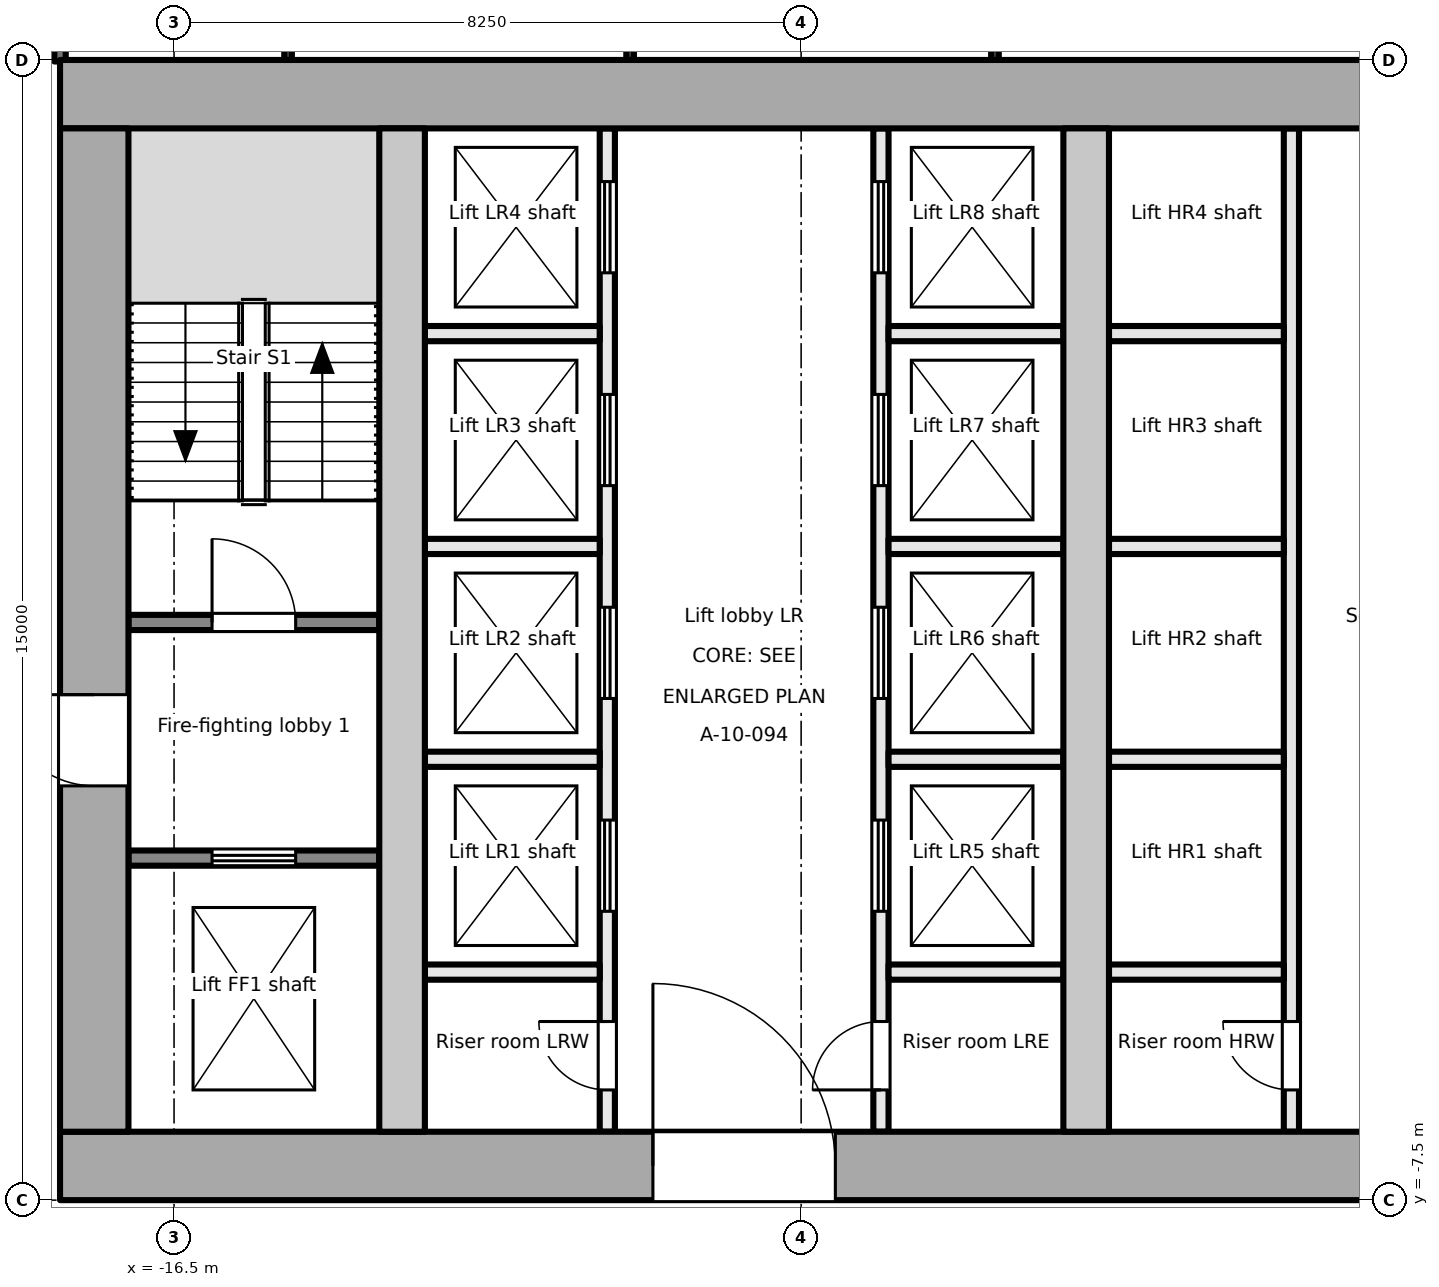
"""IFC4 building model, lengths in metres.
Left out: names, types, materials, properties, quantities, classifications, styles, units other than length and angle.
Written with IfcOpenShell. Run it as: python <this file> out.ifc"""

import sys

from ifc_helpers import new_model, si_unit, direction, frame, frame_2d, origin, place, context, subcontext, project, spatial, rectangle, extrude, element, fill, save


model = new_model("IFC4")
c1 = context("Model", 3, precision=1e-05, world=origin(), true_north=direction((0.0, 1.0)))
c2 = subcontext(c1, "Body", "Model", "MODEL_VIEW")
j1 = project(units=[si_unit("LENGTHUNIT", "METRE"), si_unit("PLANEANGLEUNIT", "RADIAN")], contexts=[c1])
p1 = place(None, origin())
s1 = spatial("IfcSite", under=j1, at=p1, CompositionType="ELEMENT")
p2 = place(p1, origin())
s2 = spatial("IfcBuilding", under=s1, at=p2, CompositionType="ELEMENT")
p3 = place(p2, frame((0.0, 0.0, 107.7)))
s3 = spatial("IfcBuildingStorey", under=s2, at=p3, CompositionType="ELEMENT", Elevation=107.7)
p4 = place(p3, frame((-18.0, -7.05, -0.2), z_axis=(0.0, 0.0, 1.0), x_axis=(1.0, 0.0, 0.0)))
e1 = element("IfcWall", 1, at=p4, inside=s3, PredefinedType="SHEAR", context=c2, shape_type="SweptSolid", body=[
    extrude(rectangle(XDim=36.0, YDim=0.9, at=frame_2d((18.0, 0.0))), origin(), (0.0, 0.0, 1.0), 4.0),
])
p5 = place(p4, frame((7.8, 0.0, 0.2)))
e2 = element("IfcOpeningElement", 2, at=p5, cuts=e1, PredefinedType="OPENING", context=c2, shape_type="SweptSolid", body=[
    extrude(rectangle(XDim=2.4, YDim=2.1, at=frame_2d((1.2, 1.05))), frame((0.0, 0.46, 0.0), z_axis=(0.0, -1.0, 0.0), x_axis=(1.0, 0.0, 0.0)), (0.0, 0.0, 1.0), 0.921),
])
p6 = place(p4, frame((17.4, 0.0, 0.2)))
e3 = element("IfcOpeningElement", 3, at=p6, cuts=e1, PredefinedType="OPENING", context=c2, shape_type="SweptSolid", body=[
    extrude(rectangle(XDim=1.2, YDim=2.1, at=frame_2d((0.6, 1.05))), frame((0.0, 0.46, 0.0), z_axis=(0.0, -1.0, 0.0), x_axis=(1.0, 0.0, 0.0)), (0.0, 0.0, 1.0), 0.921),
])
p7 = place(p4, frame((26.1, 0.0, 0.2)))
e4 = element("IfcOpeningElement", 4, at=p7, cuts=e1, PredefinedType="OPENING", context=c2, shape_type="SweptSolid", body=[
    extrude(rectangle(XDim=2.4, YDim=2.1, at=frame_2d((1.2, 1.05))), frame((0.0, 0.46, 0.0), z_axis=(0.0, -1.0, 0.0), x_axis=(1.0, 0.0, 0.0)), (0.0, 0.0, 1.0), 0.921),
])
p8 = place(p3, frame((-18.0, 7.05, -0.2), z_axis=(0.0, 0.0, 1.0), x_axis=(1.0, 0.0, 0.0)))
e5 = element("IfcWall", 5, at=p8, inside=s3, PredefinedType="SHEAR", context=c2, shape_type="SweptSolid", body=[
    extrude(rectangle(XDim=36.0, YDim=0.9, at=frame_2d((18.0, 0.0))), origin(), (0.0, 0.0, 1.0), 4.0),
])
p9 = place(p3, frame((-17.55, -6.6, -0.2), z_axis=(0.0, 0.0, 1.0), x_axis=(0.0, 1.0, 0.0)))
e6 = element("IfcWall", 6, at=p9, inside=s3, PredefinedType="SHEAR", context=c2, shape_type="SweptSolid", body=[
    extrude(rectangle(XDim=13.2, YDim=0.9, at=frame_2d((6.6, 0.0))), origin(), (0.0, 0.0, 1.0), 4.0),
])
p10 = place(p9, frame((4.55, 0.0, 0.2)))
e7 = element("IfcOpeningElement", 7, at=p10, cuts=e6, PredefinedType="OPENING", context=c2, shape_type="SweptSolid", body=[
    extrude(rectangle(XDim=1.2, YDim=2.1, at=frame_2d((0.6, 1.05))), frame((0.0, 0.46, 0.0), z_axis=(0.0, -1.0, 0.0), x_axis=(1.0, 0.0, 0.0)), (0.0, 0.0, 1.0), 0.921),
])
for number, where, z_axis, x_axis in (
    (8, (-13.5, -6.6, -0.2), (0.0, 0.0, 1.0), (0.0, 1.0, 0.0)),
    (9, (-4.5, -6.6, -0.2), (0.0, 0.0, 1.0), (0.0, 1.0, 0.0)),
):
    element("IfcWall", number, at=place(p3, frame(where, z_axis=z_axis, x_axis=x_axis)), inside=s3, PredefinedType="SHEAR", context=c2, shape_type="SweptSolid", body=[
        extrude(rectangle(XDim=13.2, YDim=0.6, at=frame_2d((6.6, 0.0))), origin(), (0.0, 0.0, 1.0), 4.0),
    ])
p11 = place(p3, frame((-17.1, -3.0, 0.0), z_axis=(0.0, 0.0, 1.0), x_axis=(1.0, 0.0, 0.0)))
e10 = element("IfcWall", 10, at=p11, inside=s3, PredefinedType="PARTITIONING", context=c2, shape_type="SweptSolid", body=[
    extrude(rectangle(XDim=3.3, YDim=0.2, at=frame_2d((1.65, 0.0))), origin(), (0.0, 0.0, 1.0), 3.8),
])
p12 = place(p11, frame((1.1, 0.0, 0.0)))
e11 = element("IfcOpeningElement", 11, at=p12, cuts=e10, PredefinedType="OPENING", context=c2, shape_type="SweptSolid", body=[
    extrude(rectangle(XDim=1.1, YDim=2.1, at=frame_2d((0.55, 1.05))), frame((0.0, 0.111, 0.0), z_axis=(0.0, -1.0, 0.0), x_axis=(1.0, 0.0, 0.0)), (0.0, 0.0, 1.0), 0.221),
])
p13 = place(p3, frame((-17.1, 0.1, 0.0), z_axis=(0.0, 0.0, 1.0), x_axis=(1.0, 0.0, 0.0)))
e12 = element("IfcWall", 12, at=p13, inside=s3, PredefinedType="PARTITIONING", context=c2, shape_type="SweptSolid", body=[
    extrude(rectangle(XDim=3.3, YDim=0.2, at=frame_2d((1.65, 0.0))), origin(), (0.0, 0.0, 1.0), 3.8),
])
p14 = place(p13, frame((1.1, 0.0, 0.0)))
e13 = element("IfcOpeningElement", 13, at=p14, cuts=e12, PredefinedType="OPENING", context=c2, shape_type="SweptSolid", body=[
    extrude(rectangle(XDim=1.1, YDim=2.1, at=frame_2d((0.55, 1.05))), frame((0.0, 0.111, 0.0), z_axis=(0.0, -1.0, 0.0), x_axis=(1.0, 0.0, 0.0)), (0.0, 0.0, 1.0), 0.221),
])
p15 = place(p3, frame((-10.8, -6.6, 0.0), z_axis=(0.0, 0.0, 1.0), x_axis=(0.0, 1.0, 0.0)))
e14 = element("IfcWall", 14, at=p15, inside=s3, PredefinedType="PARTITIONING", context=c2, shape_type="SweptSolid", body=[
    extrude(rectangle(XDim=13.2, YDim=0.2, at=frame_2d((6.6, 0.0))), origin(), (0.0, 0.0, 1.0), 3.8),
])
p16 = place(p15, frame((0.55, 0.0, 0.0)))
e15 = element("IfcOpeningElement", 15, at=p16, cuts=e14, PredefinedType="OPENING", context=c2, shape_type="SweptSolid", body=[
    extrude(rectangle(XDim=0.9, YDim=2.1, at=frame_2d((0.45, 1.05))), frame((0.0, 0.111, 0.0), z_axis=(0.0, -1.0, 0.0), x_axis=(1.0, 0.0, 0.0)), (0.0, 0.0, 1.0), 0.221),
])
p17 = place(p15, frame((2.9, 0.0, 0.0)))
e16 = element("IfcOpeningElement", 16, at=p17, cuts=e14, PredefinedType="OPENING", context=c2, shape_type="SweptSolid", body=[
    extrude(rectangle(XDim=1.2, YDim=2.1, at=frame_2d((0.6, 1.05))), frame((0.0, 0.111, 0.0), z_axis=(0.0, -1.0, 0.0), x_axis=(1.0, 0.0, 0.0)), (0.0, 0.0, 1.0), 0.221),
])
p18 = place(p15, frame((5.7, 0.0, 0.0)))
e17 = element("IfcOpeningElement", 17, at=p18, cuts=e14, PredefinedType="OPENING", context=c2, shape_type="SweptSolid", body=[
    extrude(rectangle(XDim=1.2, YDim=2.1, at=frame_2d((0.6, 1.05))), frame((0.0, 0.111, 0.0), z_axis=(0.0, -1.0, 0.0), x_axis=(1.0, 0.0, 0.0)), (0.0, 0.0, 1.0), 0.221),
])
p19 = place(p15, frame((8.5, 0.0, 0.0)))
e18 = element("IfcOpeningElement", 18, at=p19, cuts=e14, PredefinedType="OPENING", context=c2, shape_type="SweptSolid", body=[
    extrude(rectangle(XDim=1.2, YDim=2.1, at=frame_2d((0.6, 1.05))), frame((0.0, 0.111, 0.0), z_axis=(0.0, -1.0, 0.0), x_axis=(1.0, 0.0, 0.0)), (0.0, 0.0, 1.0), 0.221),
])
p20 = place(p15, frame((11.3, 0.0, 0.0)))
e19 = element("IfcOpeningElement", 19, at=p20, cuts=e14, PredefinedType="OPENING", context=c2, shape_type="SweptSolid", body=[
    extrude(rectangle(XDim=1.2, YDim=2.1, at=frame_2d((0.6, 1.05))), frame((0.0, 0.111, 0.0), z_axis=(0.0, -1.0, 0.0), x_axis=(1.0, 0.0, 0.0)), (0.0, 0.0, 1.0), 0.221),
])
p21 = place(p3, frame((-7.2, -6.6, 0.0), z_axis=(0.0, 0.0, 1.0), x_axis=(0.0, 1.0, 0.0)))
e20 = element("IfcWall", 20, at=p21, inside=s3, PredefinedType="PARTITIONING", context=c2, shape_type="SweptSolid", body=[
    extrude(rectangle(XDim=13.2, YDim=0.2, at=frame_2d((6.6, 0.0))), origin(), (0.0, 0.0, 1.0), 3.8),
])
p22 = place(p21, frame((0.55, 0.0, 0.0)))
e21 = element("IfcOpeningElement", 21, at=p22, cuts=e20, PredefinedType="OPENING", context=c2, shape_type="SweptSolid", body=[
    extrude(rectangle(XDim=0.9, YDim=2.1, at=frame_2d((0.45, 1.05))), frame((0.0, 0.111, 0.0), z_axis=(0.0, -1.0, 0.0), x_axis=(1.0, 0.0, 0.0)), (0.0, 0.0, 1.0), 0.221),
])
p23 = place(p21, frame((2.9, 0.0, 0.0)))
e22 = element("IfcOpeningElement", 22, at=p23, cuts=e20, PredefinedType="OPENING", context=c2, shape_type="SweptSolid", body=[
    extrude(rectangle(XDim=1.2, YDim=2.1, at=frame_2d((0.6, 1.05))), frame((0.0, 0.111, 0.0), z_axis=(0.0, -1.0, 0.0), x_axis=(1.0, 0.0, 0.0)), (0.0, 0.0, 1.0), 0.221),
])
p24 = place(p21, frame((5.7, 0.0, 0.0)))
e23 = element("IfcOpeningElement", 23, at=p24, cuts=e20, PredefinedType="OPENING", context=c2, shape_type="SweptSolid", body=[
    extrude(rectangle(XDim=1.2, YDim=2.1, at=frame_2d((0.6, 1.05))), frame((0.0, 0.111, 0.0), z_axis=(0.0, -1.0, 0.0), x_axis=(1.0, 0.0, 0.0)), (0.0, 0.0, 1.0), 0.221),
])
p25 = place(p21, frame((8.5, 0.0, 0.0)))
e24 = element("IfcOpeningElement", 24, at=p25, cuts=e20, PredefinedType="OPENING", context=c2, shape_type="SweptSolid", body=[
    extrude(rectangle(XDim=1.2, YDim=2.1, at=frame_2d((0.6, 1.05))), frame((0.0, 0.111, 0.0), z_axis=(0.0, -1.0, 0.0), x_axis=(1.0, 0.0, 0.0)), (0.0, 0.0, 1.0), 0.221),
])
p26 = place(p21, frame((11.3, 0.0, 0.0)))
e25 = element("IfcOpeningElement", 25, at=p26, cuts=e20, PredefinedType="OPENING", context=c2, shape_type="SweptSolid", body=[
    extrude(rectangle(XDim=1.2, YDim=2.1, at=frame_2d((0.6, 1.05))), frame((0.0, 0.111, 0.0), z_axis=(0.0, -1.0, 0.0), x_axis=(1.0, 0.0, 0.0)), (0.0, 0.0, 1.0), 0.221),
])
for number, where, z_axis, x_axis in (
    (26, (-13.2, -1.7, 0.0), (0.0, 0.0, 1.0), (1.0, 0.0, 0.0)),
    (27, (-13.2, 1.1, 0.0), (0.0, 0.0, 1.0), (1.0, 0.0, 0.0)),
    (28, (-13.2, 3.9, 0.0), (0.0, 0.0, 1.0), (1.0, 0.0, 0.0)),
    (29, (-13.2, -4.5, 0.0), (0.0, 0.0, 1.0), (1.0, 0.0, 0.0)),
    (30, (-7.1, -1.7, 0.0), (0.0, 0.0, 1.0), (1.0, 0.0, 0.0)),
    (31, (-7.1, 1.1, 0.0), (0.0, 0.0, 1.0), (1.0, 0.0, 0.0)),
    (32, (-7.1, 3.9, 0.0), (0.0, 0.0, 1.0), (1.0, 0.0, 0.0)),
    (33, (-7.1, -4.5, 0.0), (0.0, 0.0, 1.0), (1.0, 0.0, 0.0)),
):
    element("IfcWall", number, at=place(p3, frame(where, z_axis=z_axis, x_axis=x_axis)), inside=s3, PredefinedType="PARTITIONING", context=c2, shape_type="SweptSolid", body=[
        extrude(rectangle(XDim=2.3, YDim=0.2, at=frame_2d((1.15, 0.0))), origin(), (0.0, 0.0, 1.0), 3.8),
    ])
p27 = place(p3, frame((-1.8, -6.6, 0.0), z_axis=(0.0, 0.0, 1.0), x_axis=(0.0, 1.0, 0.0)))
e34 = element("IfcWall", 34, at=p27, inside=s3, PredefinedType="PARTITIONING", context=c2, shape_type="SweptSolid", body=[
    extrude(rectangle(XDim=13.2, YDim=0.2, at=frame_2d((6.6, 0.0))), origin(), (0.0, 0.0, 1.0), 3.8),
])
p28 = place(p27, frame((0.55, 0.0, 0.0)))
e35 = element("IfcOpeningElement", 35, at=p28, cuts=e34, PredefinedType="OPENING", context=c2, shape_type="SweptSolid", body=[
    extrude(rectangle(XDim=0.9, YDim=2.1, at=frame_2d((0.45, 1.05))), frame((0.0, 0.111, 0.0), z_axis=(0.0, -1.0, 0.0), x_axis=(1.0, 0.0, 0.0)), (0.0, 0.0, 1.0), 0.221),
])
for number, where, z_axis, x_axis in (
    (36, (-4.2, -1.7, 0.0), (0.0, 0.0, 1.0), (1.0, 0.0, 0.0)),
    (37, (-4.2, 1.1, 0.0), (0.0, 0.0, 1.0), (1.0, 0.0, 0.0)),
    (38, (-4.2, 3.9, 0.0), (0.0, 0.0, 1.0), (1.0, 0.0, 0.0)),
    (39, (-4.2, -4.5, 0.0), (0.0, 0.0, 1.0), (1.0, 0.0, 0.0)),
):
    element("IfcWall", number, at=place(p3, frame(where, z_axis=z_axis, x_axis=x_axis)), inside=s3, PredefinedType="PARTITIONING", context=c2, shape_type="SweptSolid", body=[
        extrude(rectangle(XDim=2.3, YDim=0.2, at=frame_2d((1.15, 0.0))), origin(), (0.0, 0.0, 1.0), 3.8),
    ])
p29 = place(p3, frame((-18.0, 10.52, 0.0), z_axis=(0.0, 0.0, 1.0), x_axis=(0.0, -1.0, 0.0)))
e40 = element("IfcWall", 40, at=p29, inside=s3, PredefinedType="PARTITIONING", context=c2, shape_type="SweptSolid", body=[
    extrude(rectangle(XDim=3.04, YDim=0.15, at=frame_2d((1.52, 0.0))), origin(), (0.0, 0.0, 1.0), 3.8),
])
p30 = place(p3, frame((-15.0, 7.5, 0.0), z_axis=(0.0, 0.0, 1.0), x_axis=(0.0, 1.0, 0.0)))
e41 = element("IfcWall", 41, at=p30, inside=s3, PredefinedType="PARTITIONING", context=c2, shape_type="SweptSolid", body=[
    extrude(rectangle(XDim=3.0, YDim=0.1, at=frame_2d((1.5, 0.0))), origin(), (0.0, 0.0, 1.0), 3.8),
])
p31 = place(p30, frame((0.76, 0.0, 0.0)))
e42 = element("IfcOpeningElement", 42, at=p31, cuts=e41, PredefinedType="OPENING", context=c2, shape_type="SweptSolid", body=[
    extrude(rectangle(XDim=0.8, YDim=2.1, at=frame_2d((0.4, 1.05))), frame((0.0, 0.061, 0.0), z_axis=(0.0, -1.0, 0.0), x_axis=(1.0, 0.0, 0.0)), (0.0, 0.0, 1.0), 0.121),
])
p32 = place(p3, frame((-10.5, 10.45, 0.0), z_axis=(0.0, 0.0, 1.0), x_axis=(0.0, -1.0, 0.0)))
e43 = element("IfcWall", 43, at=p32, inside=s3, PredefinedType="PARTITIONING", context=c2, shape_type="SweptSolid", body=[
    extrude(rectangle(XDim=2.95, YDim=0.1, at=frame_2d((1.475, 0.0))), origin(), (0.0, 0.0, 1.0), 3.8),
])
p33 = place(p32, frame((1.075, 0.0, 0.0)))
e44 = element("IfcOpeningElement", 44, at=p33, cuts=e43, PredefinedType="OPENING", context=c2, shape_type="SweptSolid", body=[
    extrude(rectangle(XDim=0.8, YDim=2.1, at=frame_2d((0.4, 1.05))), frame((0.0, 0.061, 0.0), z_axis=(0.0, -1.0, 0.0), x_axis=(1.0, 0.0, 0.0)), (0.0, 0.0, 1.0), 0.121),
])
p34 = place(p3, frame((-5.7, 10.45, 0.0), z_axis=(0.0, 0.0, 1.0), x_axis=(0.0, -1.0, 0.0)))
e45 = element("IfcWall", 45, at=p34, inside=s3, PredefinedType="PARTITIONING", context=c2, shape_type="SweptSolid", body=[
    extrude(rectangle(XDim=2.95, YDim=0.1, at=frame_2d((1.475, 0.0))), origin(), (0.0, 0.0, 1.0), 3.8),
])
p35 = place(p34, frame((1.025, 0.0, 0.0)))
e46 = element("IfcOpeningElement", 46, at=p35, cuts=e45, PredefinedType="OPENING", context=c2, shape_type="SweptSolid", body=[
    extrude(rectangle(XDim=0.9, YDim=2.1, at=frame_2d((0.45, 1.05))), frame((0.0, 0.061, 0.0), z_axis=(0.0, -1.0, 0.0), x_axis=(1.0, 0.0, 0.0)), (0.0, 0.0, 1.0), 0.121),
])
p36 = place(p12, origin())
e47 = element("IfcDoor", 47, at=p36, inside=s3, OperationType="DOUBLE_DOOR_SLIDING", PredefinedType="DOOR", context=c2, shape_type="SweptSolid", body=[
    extrude(rectangle(XDim=1.1, YDim=2.1, at=frame_2d((0.55, 1.05))), frame((0.0, 0.025, 0.0), z_axis=(0.0, -1.0, 0.0), x_axis=(1.0, 0.0, 0.0)), (0.0, 0.0, 1.0), 0.05),
])
fill(e11, e47)
p37 = place(p10, origin())
e48 = element("IfcDoor", 48, at=p37, inside=s3, OperationType="SINGLE_SWING_RIGHT", PredefinedType="DOOR", context=c2, shape_type="SweptSolid", body=[
    extrude(rectangle(XDim=1.2, YDim=2.1, at=frame_2d((0.6, 1.05))), frame((0.0, 0.025, 0.0), z_axis=(0.0, -1.0, 0.0), x_axis=(1.0, 0.0, 0.0)), (0.0, 0.0, 1.0), 0.05),
])
fill(e7, e48)
p38 = place(p14, origin())
e49 = element("IfcDoor", 49, at=p38, inside=s3, OperationType="SINGLE_SWING_LEFT", PredefinedType="DOOR", context=c2, shape_type="SweptSolid", body=[
    extrude(rectangle(XDim=1.1, YDim=2.1, at=frame_2d((0.55, 1.05))), frame((0.0, 0.025, 0.0), z_axis=(0.0, -1.0, 0.0), x_axis=(1.0, 0.0, 0.0)), (0.0, 0.0, 1.0), 0.05),
])
fill(e13, e49)
p39 = place(p16, origin())
e50 = element("IfcDoor", 50, at=p39, inside=s3, OperationType="SINGLE_SWING_RIGHT", PredefinedType="DOOR", context=c2, shape_type="SweptSolid", body=[
    extrude(rectangle(XDim=0.9, YDim=2.1, at=frame_2d((0.45, 1.05))), frame((0.0, 0.025, 0.0), z_axis=(0.0, -1.0, 0.0), x_axis=(1.0, 0.0, 0.0)), (0.0, 0.0, 1.0), 0.05),
])
fill(e15, e50)
p40 = place(p17, origin())
e51 = element("IfcDoor", 51, at=p40, inside=s3, OperationType="DOUBLE_DOOR_SLIDING", PredefinedType="DOOR", context=c2, shape_type="SweptSolid", body=[
    extrude(rectangle(XDim=1.2, YDim=2.1, at=frame_2d((0.6, 1.05))), frame((0.0, 0.025, 0.0), z_axis=(0.0, -1.0, 0.0), x_axis=(1.0, 0.0, 0.0)), (0.0, 0.0, 1.0), 0.05),
])
fill(e16, e51)
p41 = place(p18, origin())
e52 = element("IfcDoor", 52, at=p41, inside=s3, OperationType="DOUBLE_DOOR_SLIDING", PredefinedType="DOOR", context=c2, shape_type="SweptSolid", body=[
    extrude(rectangle(XDim=1.2, YDim=2.1, at=frame_2d((0.6, 1.05))), frame((0.0, 0.025, 0.0), z_axis=(0.0, -1.0, 0.0), x_axis=(1.0, 0.0, 0.0)), (0.0, 0.0, 1.0), 0.05),
])
fill(e17, e52)
p42 = place(p19, origin())
e53 = element("IfcDoor", 53, at=p42, inside=s3, OperationType="DOUBLE_DOOR_SLIDING", PredefinedType="DOOR", context=c2, shape_type="SweptSolid", body=[
    extrude(rectangle(XDim=1.2, YDim=2.1, at=frame_2d((0.6, 1.05))), frame((0.0, 0.025, 0.0), z_axis=(0.0, -1.0, 0.0), x_axis=(1.0, 0.0, 0.0)), (0.0, 0.0, 1.0), 0.05),
])
fill(e18, e53)
p43 = place(p20, origin())
e54 = element("IfcDoor", 54, at=p43, inside=s3, OperationType="DOUBLE_DOOR_SLIDING", PredefinedType="DOOR", context=c2, shape_type="SweptSolid", body=[
    extrude(rectangle(XDim=1.2, YDim=2.1, at=frame_2d((0.6, 1.05))), frame((0.0, 0.025, 0.0), z_axis=(0.0, -1.0, 0.0), x_axis=(1.0, 0.0, 0.0)), (0.0, 0.0, 1.0), 0.05),
])
fill(e19, e54)
p44 = place(p22, origin())
e55 = element("IfcDoor", 55, at=p44, inside=s3, OperationType="SINGLE_SWING_LEFT", PredefinedType="DOOR", context=c2, shape_type="SweptSolid", body=[
    extrude(rectangle(XDim=0.9, YDim=2.1, at=frame_2d((0.45, 1.05))), frame((0.0, 0.025, 0.0), z_axis=(0.0, -1.0, 0.0), x_axis=(1.0, 0.0, 0.0)), (0.0, 0.0, 1.0), 0.05),
])
fill(e21, e55)
p45 = place(p23, origin())
e56 = element("IfcDoor", 56, at=p45, inside=s3, OperationType="DOUBLE_DOOR_SLIDING", PredefinedType="DOOR", context=c2, shape_type="SweptSolid", body=[
    extrude(rectangle(XDim=1.2, YDim=2.1, at=frame_2d((0.6, 1.05))), frame((0.0, 0.025, 0.0), z_axis=(0.0, -1.0, 0.0), x_axis=(1.0, 0.0, 0.0)), (0.0, 0.0, 1.0), 0.05),
])
fill(e22, e56)
p46 = place(p24, origin())
e57 = element("IfcDoor", 57, at=p46, inside=s3, OperationType="DOUBLE_DOOR_SLIDING", PredefinedType="DOOR", context=c2, shape_type="SweptSolid", body=[
    extrude(rectangle(XDim=1.2, YDim=2.1, at=frame_2d((0.6, 1.05))), frame((0.0, 0.025, 0.0), z_axis=(0.0, -1.0, 0.0), x_axis=(1.0, 0.0, 0.0)), (0.0, 0.0, 1.0), 0.05),
])
fill(e23, e57)
p47 = place(p25, origin())
e58 = element("IfcDoor", 58, at=p47, inside=s3, OperationType="DOUBLE_DOOR_SLIDING", PredefinedType="DOOR", context=c2, shape_type="SweptSolid", body=[
    extrude(rectangle(XDim=1.2, YDim=2.1, at=frame_2d((0.6, 1.05))), frame((0.0, 0.025, 0.0), z_axis=(0.0, -1.0, 0.0), x_axis=(1.0, 0.0, 0.0)), (0.0, 0.0, 1.0), 0.05),
])
fill(e24, e58)
p48 = place(p26, origin())
e59 = element("IfcDoor", 59, at=p48, inside=s3, OperationType="DOUBLE_DOOR_SLIDING", PredefinedType="DOOR", context=c2, shape_type="SweptSolid", body=[
    extrude(rectangle(XDim=1.2, YDim=2.1, at=frame_2d((0.6, 1.05))), frame((0.0, 0.025, 0.0), z_axis=(0.0, -1.0, 0.0), x_axis=(1.0, 0.0, 0.0)), (0.0, 0.0, 1.0), 0.05),
])
fill(e25, e59)
p49 = place(p5, origin())
e60 = element("IfcDoor", 60, at=p49, inside=s3, OperationType="DOUBLE_DOOR_DOUBLE_SWING", PredefinedType="DOOR", context=c2, shape_type="SweptSolid", body=[
    extrude(rectangle(XDim=2.4, YDim=2.1, at=frame_2d((1.2, 1.05))), frame((0.0, 0.025, 0.0), z_axis=(0.0, -1.0, 0.0), x_axis=(1.0, 0.0, 0.0)), (0.0, 0.0, 1.0), 0.05),
])
fill(e2, e60)
p50 = place(p28, origin())
e61 = element("IfcDoor", 61, at=p50, inside=s3, OperationType="SINGLE_SWING_RIGHT", PredefinedType="DOOR", context=c2, shape_type="SweptSolid", body=[
    extrude(rectangle(XDim=0.9, YDim=2.1, at=frame_2d((0.45, 1.05))), frame((0.0, 0.025, 0.0), z_axis=(0.0, -1.0, 0.0), x_axis=(1.0, 0.0, 0.0)), (0.0, 0.0, 1.0), 0.05),
])
fill(e35, e61)
save(model, sys.argv[1])
